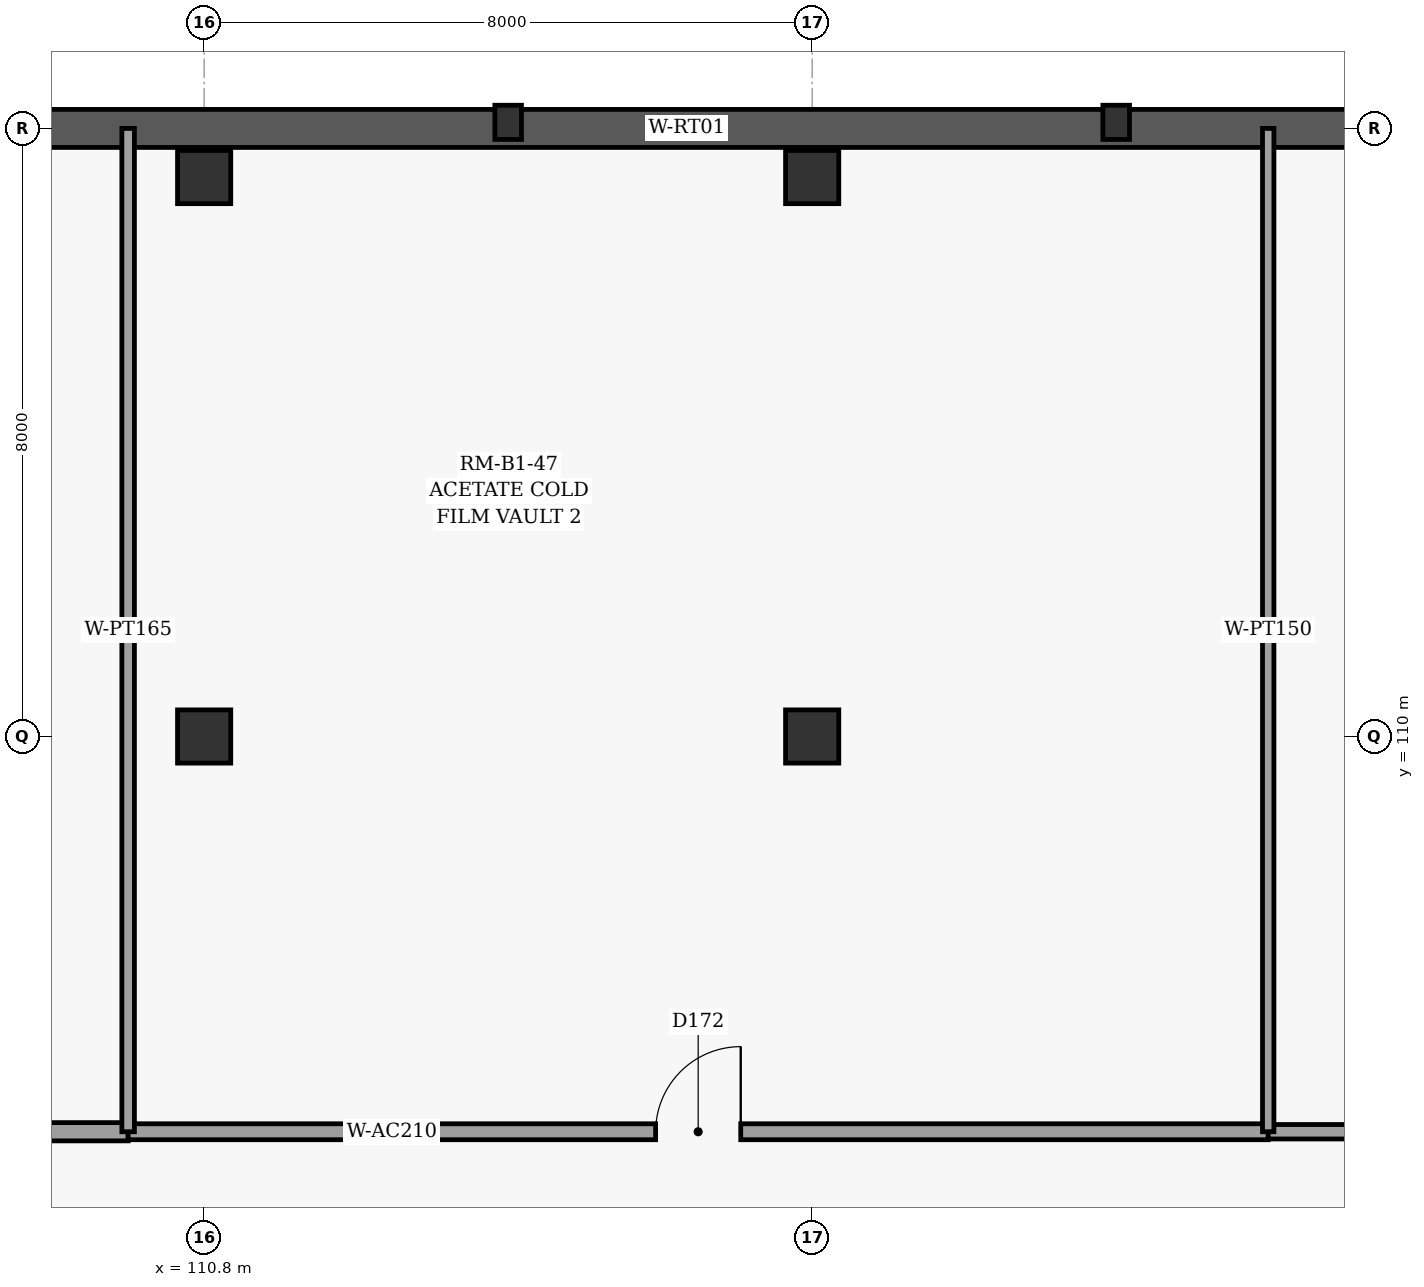
"""IFC4 building model, lengths in metres.
Left out: names, types, materials, properties, quantities, classifications, styles, units other than length and angle.
Written with IfcOpenShell. Run it as: python <this file> out.ifc"""

import sys

from ifc_helpers import new_model, si_unit, direction, frame, frame_2d, origin, origin_2d, place, context, subcontext, project, spatial, rectangle, extrude, element, fill, save


model = new_model("IFC4")
c1 = context("Model", 3, precision=1e-05, world=origin(), true_north=direction((0.0, 1.0)))
c2 = subcontext(c1, "Body", "Model", "MODEL_VIEW")
j1 = project(units=[si_unit("LENGTHUNIT", "METRE"), si_unit("PLANEANGLEUNIT", "RADIAN")], contexts=[c1])
p1 = place(None, origin())
s1 = spatial("IfcSite", under=j1, at=p1, CompositionType="ELEMENT")
p2 = place(p1, origin())
s2 = spatial("IfcBuilding", under=s1, at=p2, CompositionType="ELEMENT")
p3 = place(p2, frame((0.0, 0.0, -4.8)))
s3 = spatial("IfcBuildingStorey", under=s2, at=p3, CompositionType="ELEMENT", Elevation=-4.8)
for number, where, z_axis, x_axis in (
    (1, (110.8, 110.0, 0.0), (0.0, 0.0, 1.0), (1.0, 0.0, 0.0)),
    (2, (110.8, 117.36, 0.0), (0.0, 0.0, 1.0), (1.0, 0.0, 0.0)),
    (3, (118.8, 110.0, 0.0), (0.0, 0.0, 1.0), (1.0, 0.0, 0.0)),
    (4, (118.8, 117.36, 0.0), (0.0, 0.0, 1.0), (1.0, 0.0, 0.0)),
):
    element("IfcColumn", number, at=place(p3, frame(where, z_axis=z_axis, x_axis=x_axis)), inside=s3, PredefinedType="COLUMN", context=c2, shape_type="SweptSolid", body=[
        extrude(rectangle(XDim=0.7, YDim=0.7, at=origin_2d()), origin(), (0.0, 0.0, 1.0), 4.8),
    ])
for number, where, z_axis, x_axis in (
    (5, (114.8, 118.08, -0.5), (0.0, 0.0, 1.0), (0.0, 1.0, 0.0)),
    (6, (122.8, 118.08, -0.5), (0.0, 0.0, 1.0), (0.0, 1.0, 0.0)),
):
    element("IfcColumn", number, at=place(p3, frame(where, z_axis=z_axis, x_axis=x_axis)), inside=s3, PredefinedType="PILASTER", context=c2, shape_type="SweptSolid", body=[
        extrude(rectangle(XDim=0.35, YDim=0.45, at=origin_2d()), origin(), (0.0, 0.0, 1.0), 5.3),
    ])
p4 = place(p3, frame((94.8, 118.0, 0.0), z_axis=(0.0, 0.0, 1.0), x_axis=(1.0, 0.0, 0.0)))
e7 = element("IfcWall", 7, at=p4, inside=s3, PredefinedType="USERDEFINED", context=c2, shape_type="SweptSolid", body=[
    extrude(rectangle(XDim=44.7, YDim=0.5, at=frame_2d((22.35, 0.0))), origin(), (0.0, 0.0, 1.0), 4.45),
])
p5 = place(p3, frame((94.8, 104.8, 0.0), z_axis=(0.0, 0.0, 1.0), x_axis=(1.0, 0.0, 0.0)))
e8 = element("IfcWall", 8, at=p5, inside=s3, PredefinedType="PARTITIONING", context=c2, shape_type="SweptSolid", body=[
    extrude(rectangle(XDim=15.0, YDim=0.24, at=frame_2d((7.5, 0.0))), origin(), (0.0, 0.0, 1.0), 4.45),
])
p6 = place(p5, frame((6.96, 0.0, 0.0)))
e9 = element("IfcOpeningElement", 9, at=p6, cuts=e8, PredefinedType="OPENING", context=c2, shape_type="SweptSolid", body=[
    extrude(rectangle(XDim=1.08, YDim=2.15, at=frame_2d((0.54, 1.075))), frame((0.0, 0.13, 0.0), z_axis=(0.0, -1.0, 0.0), x_axis=(1.0, 0.0, 0.0)), (0.0, 0.0, 1.0), 0.26),
])
p7 = place(p3, frame((109.8, 104.8, 0.0), z_axis=(0.0, 0.0, 1.0), x_axis=(1.0, 0.0, 0.0)))
e10 = element("IfcWall", 10, at=p7, inside=s3, PredefinedType="PARTITIONING", context=c2, shape_type="SweptSolid", body=[
    extrude(rectangle(XDim=15.0, YDim=0.21, at=frame_2d((7.5, 0.0))), origin(), (0.0, 0.0, 1.0), 4.45),
])
p8 = place(p7, frame((6.94, 0.0, 0.0)))
e11 = element("IfcOpeningElement", 11, at=p8, cuts=e10, PredefinedType="OPENING", context=c2, shape_type="SweptSolid", body=[
    extrude(rectangle(XDim=1.12, YDim=2.15, at=frame_2d((0.56, 1.075))), frame((0.0, 0.115, 0.0), z_axis=(0.0, -1.0, 0.0), x_axis=(1.0, 0.0, 0.0)), (0.0, 0.0, 1.0), 0.23),
])
p9 = place(p3, frame((124.8, 104.8, 0.0), z_axis=(0.0, 0.0, 1.0), x_axis=(1.0, 0.0, 0.0)))
e12 = element("IfcWall", 12, at=p9, inside=s3, PredefinedType="PARTITIONING", context=c2, shape_type="SweptSolid", body=[
    extrude(rectangle(XDim=14.7, YDim=0.19, at=frame_2d((7.35, 0.0))), origin(), (0.0, 0.0, 1.0), 4.45),
])
p10 = place(p9, frame((6.76, 0.0, 0.0)))
e13 = element("IfcOpeningElement", 13, at=p10, cuts=e12, PredefinedType="OPENING", context=c2, shape_type="SweptSolid", body=[
    extrude(rectangle(XDim=1.18, YDim=2.15, at=frame_2d((0.59, 1.075))), frame((0.0, 0.105, 0.0), z_axis=(0.0, -1.0, 0.0), x_axis=(1.0, 0.0, 0.0)), (0.0, 0.0, 1.0), 0.21),
])
p11 = place(p3, frame((109.8, 118.0, 0.0), z_axis=(0.0, 0.0, 1.0), x_axis=(0.0, -1.0, 0.0)))
e14 = element("IfcWall", 14, at=p11, inside=s3, PredefinedType="PARTITIONING", context=c2, shape_type="SweptSolid", body=[
    extrude(rectangle(XDim=13.2, YDim=0.165, at=frame_2d((6.6, 0.0))), origin(), (0.0, 0.0, 1.0), 4.45),
])
p12 = place(p3, frame((124.8, 118.0, 0.0), z_axis=(0.0, 0.0, 1.0), x_axis=(0.0, -1.0, 0.0)))
e15 = element("IfcWall", 15, at=p12, inside=s3, PredefinedType="PARTITIONING", context=c2, shape_type="SweptSolid", body=[
    extrude(rectangle(XDim=13.2, YDim=0.15, at=frame_2d((6.6, 0.0))), origin(), (0.0, 0.0, 1.0), 4.45),
])
p13 = place(p8, origin())
e16 = element("IfcDoor", 16, at=p13, inside=s3, OperationType="SINGLE_SWING_RIGHT", PredefinedType="DOOR", context=c2, shape_type="SweptSolid", body=[
    extrude(rectangle(XDim=1.12, YDim=2.15, at=frame_2d((0.56, 1.075))), frame((0.0, 0.025, 0.0), z_axis=(0.0, -1.0, 0.0), x_axis=(1.0, 0.0, 0.0)), (0.0, 0.0, 1.0), 0.05),
])
fill(e11, e16)
save(model, sys.argv[1])
